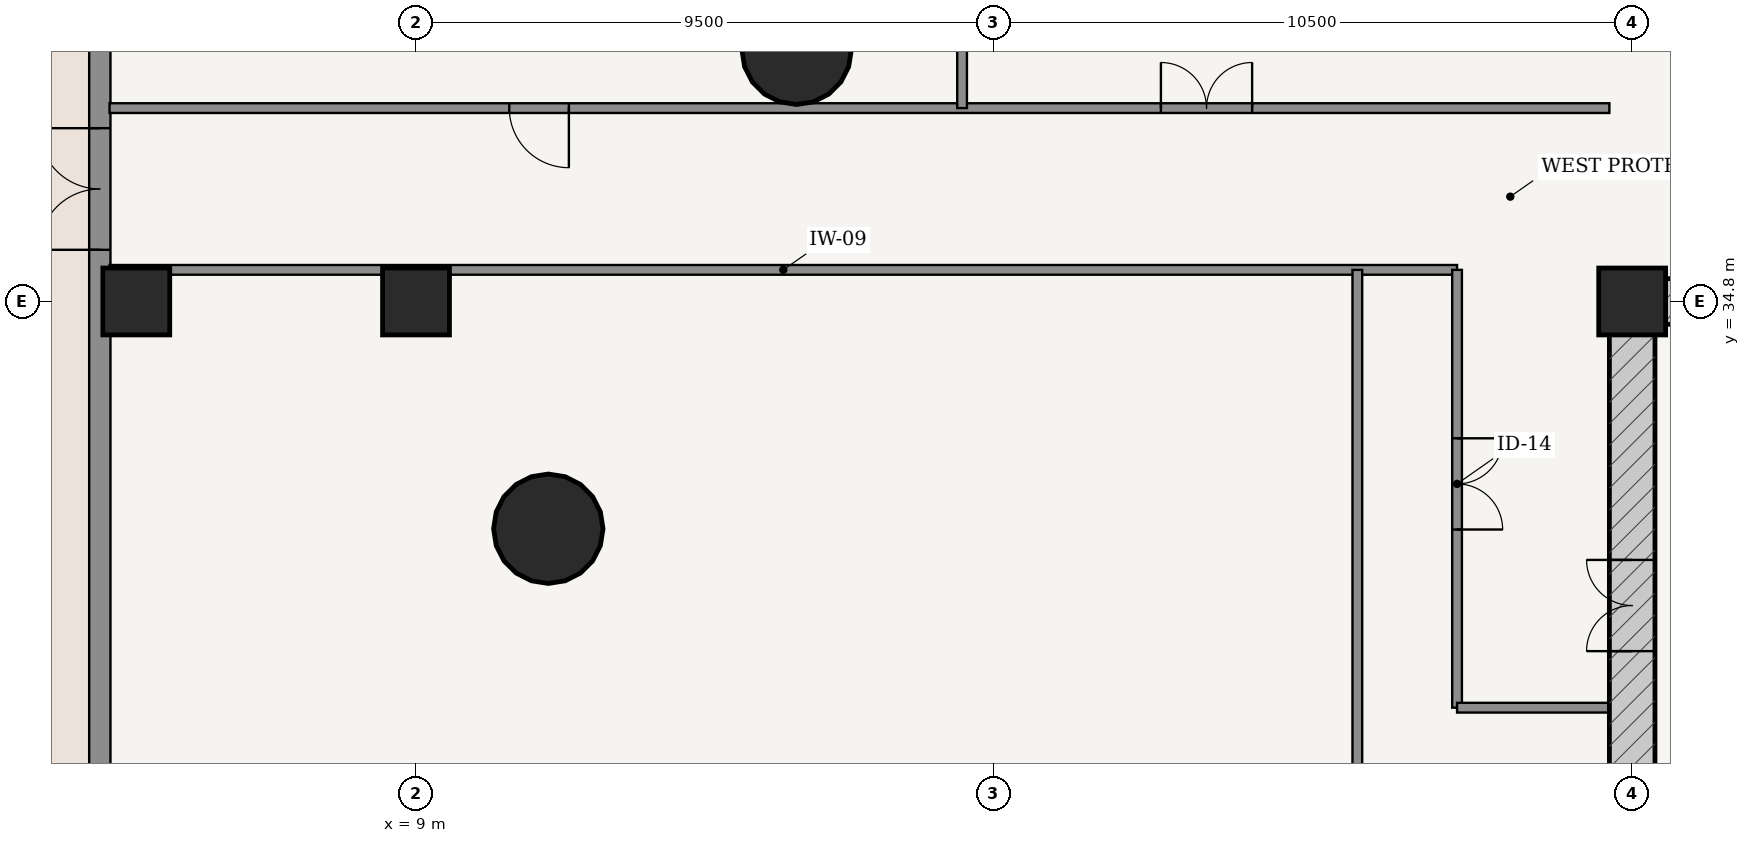
"""IFC4 building model, lengths in metres.
Left out: names, types, materials, properties, quantities, classifications, styles, units other than length and angle.
Written with IfcOpenShell. Run it as: python <this file> out.ifc"""

import sys

from ifc_helpers import new_model, si_unit, direction, frame, frame_2d, origin, origin_2d, place, context, subcontext, project, spatial, rectangle, hollow_circle, extrude, source, transform, mapped, element, fill, save


model = new_model("IFC4")
c1 = context("Model", 3, precision=1e-05, world=origin(), true_north=direction((-0.2419218956, 0.970295726276)))
c2 = subcontext(c1, "Body", "Model", "MODEL_VIEW")
j1 = project(units=[si_unit("LENGTHUNIT", "METRE"), si_unit("PLANEANGLEUNIT", "RADIAN")], contexts=[c1])
p1 = place(None, origin())
s1 = spatial("IfcSite", under=j1, at=p1, CompositionType="ELEMENT")
p2 = place(p1, origin())
s2 = spatial("IfcBuilding", under=s1, at=p2, CompositionType="ELEMENT")
p3 = place(p2, origin())
s3 = spatial("IfcBuildingStorey", under=s2, at=p3, CompositionType="ELEMENT", Elevation=0.0)
p4 = place(p3, frame((29.0, 34.8, 0.0), z_axis=(0.0, 0.0, 1.0), x_axis=(1.0, 0.0, 0.0)))
e1 = element("IfcColumn", 1, at=p4, inside=s3, PredefinedType="COLUMN", context=c2, shape_type="SweptSolid", body=[
    extrude(rectangle(XDim=1.1, YDim=1.1, at=origin_2d()), origin(), (0.0, 0.0, 1.0), 5.4),
])
p5 = place(p3, frame((28.625, 34.8, 0.0), z_axis=(0.0, 0.0, 1.0), x_axis=(1.0, 0.0, 0.0)))
e2 = element("IfcWall", 2, at=p5, inside=s3, PredefinedType="SHEAR", context=c2, shape_type="SweptSolid", body=[
    extrude(rectangle(XDim=18.75, YDim=0.75, at=frame_2d((9.375, 0.0))), origin(), (0.0, 0.0, 1.0), 5.1),
])
p6 = place(p5, frame((6.887, 0.0, 0.0)))
e3 = element("IfcOpeningElement", 3, at=p6, cuts=e2, PredefinedType="OPENING", context=c2, shape_type="SweptSolid", body=[
    extrude(rectangle(XDim=0.85, YDim=2.1, at=frame_2d((0.425, 1.05))), frame((0.0, 0.385, 0.0), z_axis=(0.0, -1.0, 0.0), x_axis=(1.0, 0.0, 0.0)), (0.0, 0.0, 1.0), 0.77),
])
p7 = place(p5, frame((8.945, 0.0, 0.0)))
e4 = element("IfcOpeningElement", 4, at=p7, cuts=e2, PredefinedType="OPENING", context=c2, shape_type="SweptSolid", body=[
    extrude(rectangle(XDim=0.86, YDim=2.1, at=frame_2d((0.43, 1.05))), frame((0.0, 0.385, 0.0), z_axis=(0.0, -1.0, 0.0), x_axis=(1.0, 0.0, 0.0)), (0.0, 0.0, 1.0), 0.77),
])
p8 = place(p5, frame((11.012, 0.0, 0.0)))
e5 = element("IfcOpeningElement", 5, at=p8, cuts=e2, PredefinedType="OPENING", context=c2, shape_type="SweptSolid", body=[
    extrude(rectangle(XDim=0.85, YDim=2.1, at=frame_2d((0.425, 1.05))), frame((0.0, 0.385, 0.0), z_axis=(0.0, -1.0, 0.0), x_axis=(1.0, 0.0, 0.0)), (0.0, 0.0, 1.0), 0.77),
])
p9 = place(p3, frame((29.0, 19.175, 0.0), z_axis=(0.0, 0.0, 1.0), x_axis=(0.0, 1.0, 0.0)))
e6 = element("IfcWall", 6, at=p9, inside=s3, PredefinedType="SHEAR", context=c2, shape_type="SweptSolid", body=[
    extrude(rectangle(XDim=15.25, YDim=0.75, at=frame_2d((7.625, 0.0))), origin(), (0.0, 0.0, 1.0), 5.1),
])
p10 = place(p9, frame((9.875, 0.0, 0.0)))
e7 = element("IfcOpeningElement", 7, at=p10, cuts=e6, PredefinedType="OPENING", context=c2, shape_type="SweptSolid", body=[
    extrude(rectangle(XDim=1.5, YDim=2.2, at=frame_2d((0.75, 1.1))), frame((0.0, 0.385, 0.0), z_axis=(0.0, -1.0, 0.0), x_axis=(1.0, 0.0, 0.0)), (0.0, 0.0, 1.0), 0.77),
])
for number, where, z_axis, x_axis in (
    (8, (15.259, 38.939, 0.0), (0.0, 0.0, 1.0), (1.0, 0.0, 0.0)),
    (9, (11.176, 31.063, 0.0), (0.0, 0.0, 1.0), (1.0, 0.0, 0.0)),
):
    element("IfcColumn", number, at=place(p3, frame(where, z_axis=z_axis, x_axis=x_axis)), inside=s3, PredefinedType="COLUMN", context=c2, shape_type="SweptSolid", body=[
        extrude(hollow_circle(Radius=0.9, WallThickness=0.055, at=origin_2d()), origin(), (0.0, 0.0, 1.0), 5.4),
    ])
for number, where, z_axis, x_axis in (
    (10, (4.4, 34.8, 0.0), (0.0, 0.0, 1.0), (1.0, 0.0, 0.0)),
    (11, (9.0, 34.8, 0.0), (0.0, 0.0, 1.0), (1.0, 0.0, 0.0)),
):
    element("IfcColumn", number, at=place(p3, frame(where, z_axis=z_axis, x_axis=x_axis)), inside=s3, PredefinedType="COLUMN", context=c2, shape_type="SweptSolid", body=[
        extrude(rectangle(XDim=1.1, YDim=1.1, at=origin_2d()), origin(), (0.0, 0.0, 1.0), 5.4),
    ])
p11 = place(p3, frame((3.8, 51.55, 0.0), z_axis=(0.0, 0.0, 1.0), x_axis=(0.0, -1.0, 0.0)))
e12 = element("IfcWall", 12, at=p11, inside=s3, PredefinedType="SOLIDWALL", context=c2, shape_type="SweptSolid", body=[
    extrude(rectangle(XDim=49.5, YDim=0.35, at=frame_2d((24.75, 0.0))), origin(), (0.0, 0.0, 1.0), 5.1),
])
p12 = place(p11, frame((13.9, 0.0, 0.0)))
e13 = element("IfcOpeningElement", 13, at=p12, cuts=e12, PredefinedType="OPENING", context=c2, shape_type="SweptSolid", body=[
    extrude(rectangle(XDim=2.0, YDim=2.2, at=frame_2d((1.0, 1.1))), frame((0.0, 0.185, 0.0), z_axis=(0.0, -1.0, 0.0), x_axis=(1.0, 0.0, 0.0)), (0.0, 0.0, 1.0), 0.37),
])
p13 = place(p3, frame((3.96, 35.32, 0.0), z_axis=(0.0, 0.0, 1.0), x_axis=(1.0, 0.0, 0.0)))
e14 = element("IfcWall", 14, at=p13, inside=s3, PredefinedType="PARTITIONING", context=c2, shape_type="SweptSolid", body=[
    extrude(rectangle(XDim=22.16, YDim=0.16, at=frame_2d((11.08, 0.0))), origin(), (0.0, 0.0, 1.0), 4.135),
])
p14 = place(p3, frame((26.12, 28.12, 0.0), z_axis=(0.0, 0.0, 1.0), x_axis=(0.0, 1.0, 0.0)))
e15 = element("IfcWall", 15, at=p14, inside=s3, PredefinedType="PARTITIONING", context=c2, shape_type="SweptSolid", body=[
    extrude(rectangle(XDim=7.2, YDim=0.16, at=frame_2d((3.6, 0.0))), origin(), (0.0, 0.0, 1.0), 4.45),
])
p15 = place(p14, frame((2.93, 0.0, 0.0)))
e16 = element("IfcOpeningElement", 16, at=p15, cuts=e15, PredefinedType="OPENING", context=c2, shape_type="SweptSolid", body=[
    extrude(rectangle(XDim=1.5, YDim=2.2, at=frame_2d((0.75, 1.1))), frame((0.0, 0.09, 0.0), z_axis=(0.0, -1.0, 0.0), x_axis=(1.0, 0.0, 0.0)), (0.0, 0.0, 1.0), 0.18),
])
p16 = place(p3, frame((26.12, 28.12, 0.0), z_axis=(0.0, 0.0, 1.0), x_axis=(1.0, 0.0, 0.0)))
e17 = element("IfcWall", 17, at=p16, inside=s3, PredefinedType="PARTITIONING", context=c2, shape_type="SweptSolid", body=[
    extrude(rectangle(XDim=2.505, YDim=0.16, at=frame_2d((1.252, 0.0))), origin(), (0.0, 0.0, 1.0), 4.45),
])
p17 = place(p3, frame((3.96, 37.98, 0.0), z_axis=(0.0, 0.0, 1.0), x_axis=(1.0, 0.0, 0.0)))
e18 = element("IfcWall", 18, at=p17, inside=s3, PredefinedType="PARTITIONING", context=c2, shape_type="SweptSolid", body=[
    extrude(rectangle(XDim=24.665, YDim=0.16, at=frame_2d((12.333, 0.0))), origin(), (0.0, 0.0, 1.0), 4.135),
])
p18 = place(p17, frame((17.29, 0.0, 0.0)))
e19 = element("IfcOpeningElement", 19, at=p18, cuts=e18, PredefinedType="OPENING", context=c2, shape_type="SweptSolid", body=[
    extrude(rectangle(XDim=1.5, YDim=2.2, at=frame_2d((0.75, 1.1))), frame((0.0, 0.09, 0.0), z_axis=(0.0, -1.0, 0.0), x_axis=(1.0, 0.0, 0.0)), (0.0, 0.0, 1.0), 0.18),
])
p19 = place(p17, frame((6.574, 0.0, 0.0)))
e20 = element("IfcOpeningElement", 20, at=p19, cuts=e18, PredefinedType="OPENING", context=c2, shape_type="SweptSolid", body=[
    extrude(rectangle(XDim=0.98, YDim=2.2, at=frame_2d((0.49, 1.1))), frame((0.0, 0.09, 0.0), z_axis=(0.0, -1.0, 0.0), x_axis=(1.0, 0.0, 0.0)), (0.0, 0.0, 1.0), 0.18),
])
p20 = place(p3, frame((24.48, 2.24, 0.0), z_axis=(0.0, 0.0, 1.0), x_axis=(0.0, 1.0, 0.0)))
e21 = element("IfcWall", 21, at=p20, inside=s3, PredefinedType="PARTITIONING", context=c2, shape_type="SweptSolid", body=[
    extrude(rectangle(XDim=33.08, YDim=0.16, at=frame_2d((16.54, 0.0))), origin(), (0.0, 0.0, 1.0), 4.45),
])
p21 = place(p20, frame((16.05, 0.0, 0.0)))
e22 = element("IfcOpeningElement", 22, at=p21, cuts=e21, PredefinedType="OPENING", context=c2, shape_type="SweptSolid", body=[
    extrude(rectangle(XDim=0.98, YDim=2.2, at=frame_2d((0.49, 1.1))), frame((0.0, 0.09, 0.0), z_axis=(0.0, -1.0, 0.0), x_axis=(1.0, 0.0, 0.0)), (0.0, 0.0, 1.0), 0.18),
])
p22 = place(p3, frame((17.98, 37.98, 0.0), z_axis=(0.0, 0.0, 1.0), x_axis=(0.0, 1.0, 0.0)))
e23 = element("IfcWall", 23, at=p22, inside=s3, PredefinedType="PARTITIONING", context=c2, shape_type="SweptSolid", body=[
    extrude(rectangle(XDim=7.72, YDim=0.16, at=frame_2d((3.86, 0.0))), origin(), (0.0, 0.0, 1.0), 4.469),
])
m1 = source(origin(), c2, "Body", "SweptSolid", [
    extrude(rectangle(XDim=2.0, YDim=2.2, at=frame_2d((1.0, 1.1))), frame((0.0, 0.025, 0.0), z_axis=(0.0, -1.0, 0.0), x_axis=(1.0, 0.0, 0.0)), (0.0, 0.0, 1.0), 0.05),
])
p23 = place(p12, frame((2.0, 0.0, 0.0), z_axis=(0.0, 0.0, 1.0), x_axis=(-1.0, 0.0, 0.0)))
e24 = element("IfcDoor", 24, at=p23, inside=s3, OperationType="DOUBLE_DOOR_SINGLE_SWING", PredefinedType="DOOR", context=c2, shape_type="MappedRepresentation", body=[
    mapped(m1, transform((0.0, 0.0, 0.0), scale=1.0)),
])
fill(e13, e24)
m2 = source(origin(), c2, "Body", "SweptSolid", [
    extrude(rectangle(XDim=1.5, YDim=2.2, at=frame_2d((0.75, 1.1))), frame((0.0, 0.025, 0.0), z_axis=(0.0, -1.0, 0.0), x_axis=(1.0, 0.0, 0.0)), (0.0, 0.0, 1.0), 0.05),
])
p24 = place(p10, origin())
e25 = element("IfcDoor", 25, at=p24, inside=s3, OperationType="DOUBLE_DOOR_SINGLE_SWING", PredefinedType="DOOR", context=c2, shape_type="MappedRepresentation", body=[
    mapped(m2, transform((0.0, 0.0, 0.0), scale=1.0)),
])
fill(e7, e25)
p25 = place(p15, frame((1.5, 0.0, 0.0), z_axis=(0.0, 0.0, 1.0), x_axis=(-1.0, 0.0, 0.0)))
e26 = element("IfcDoor", 26, at=p25, inside=s3, OperationType="DOUBLE_DOOR_SINGLE_SWING", PredefinedType="DOOR", context=c2, shape_type="MappedRepresentation", body=[
    mapped(m2, transform((0.0, 0.0, 0.0), scale=1.0)),
])
fill(e16, e26)
p26 = place(p18, origin())
e27 = element("IfcDoor", 27, at=p26, inside=s3, OperationType="DOUBLE_DOOR_SINGLE_SWING", PredefinedType="DOOR", context=c2, shape_type="MappedRepresentation", body=[
    mapped(m2, transform((0.0, 0.0, 0.0), scale=1.0)),
])
fill(e19, e27)
m3 = source(origin(), c2, "Body", "SweptSolid", [
    extrude(rectangle(XDim=0.98, YDim=2.2, at=frame_2d((0.49, 1.1))), frame((0.0, 0.025, 0.0), z_axis=(0.0, -1.0, 0.0), x_axis=(1.0, 0.0, 0.0)), (0.0, 0.0, 1.0), 0.05),
])
p27 = place(p19, frame((0.98, 0.0, 0.0), z_axis=(0.0, 0.0, 1.0), x_axis=(-1.0, 0.0, 0.0)))
e28 = element("IfcDoor", 28, at=p27, inside=s3, OperationType="SINGLE_SWING_LEFT", PredefinedType="DOOR", context=c2, shape_type="MappedRepresentation", body=[
    mapped(m3, transform((0.0, 0.0, 0.0), scale=1.0)),
])
fill(e20, e28)
save(model, sys.argv[1])
